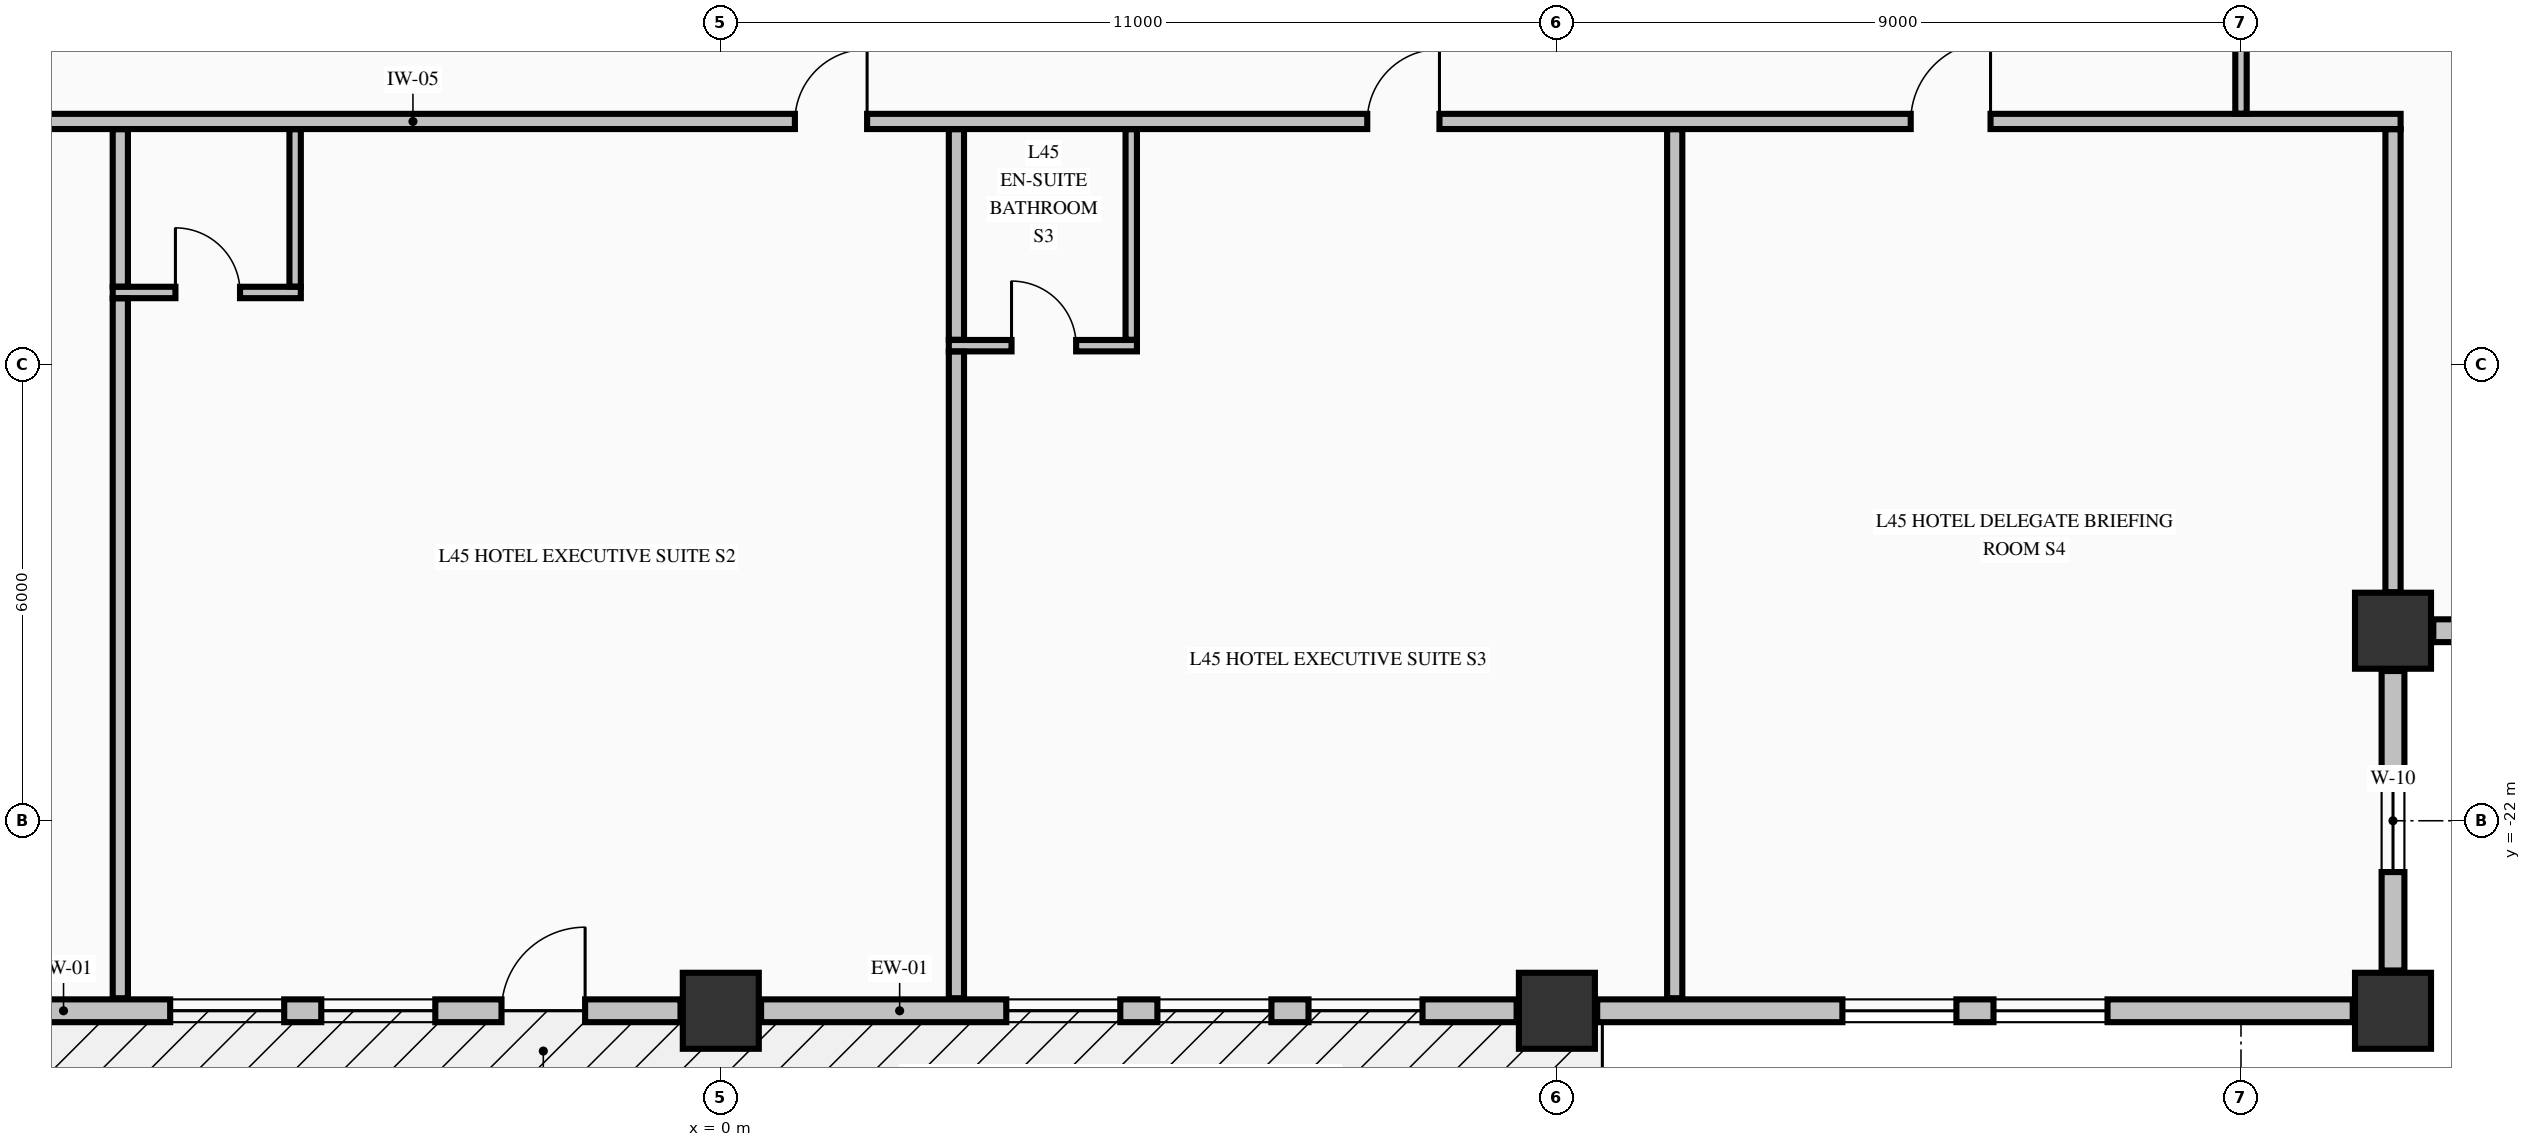
"""IFC4 building model, lengths in metres.
Left out: names, types, materials, properties, quantities, classifications, styles, units other than length and angle.
Written with IfcOpenShell. Run it as: python <this file> out.ifc"""

import sys

from ifc_helpers import new_model, si_unit, direction, frame, frame_2d, origin, origin_2d, place, context, subcontext, project, spatial, rectangle, extrude, element, fill, save


model = new_model("IFC4")
c1 = context("Model", 3, precision=1e-05, world=origin(), true_north=direction((0.0, 1.0)))
c2 = subcontext(c1, "Body", "Model", "MODEL_VIEW")
j1 = project(units=[si_unit("LENGTHUNIT", "METRE"), si_unit("PLANEANGLEUNIT", "RADIAN")], contexts=[c1])
p1 = place(None, origin())
s1 = spatial("IfcSite", under=j1, at=p1, CompositionType="ELEMENT")
p2 = place(p1, origin())
s2 = spatial("IfcBuilding", under=s1, at=p2, CompositionType="ELEMENT")
p3 = place(p2, frame((0.0, 0.0, 176.26)))
s3 = spatial("IfcBuildingStorey", under=s2, at=p3, CompositionType="ELEMENT", Elevation=176.26)
for number, where, z_axis, x_axis in (
    (1, (0.0, -24.5, -0.275), (0.0, 0.0, 1.0), (1.0, 0.0, 0.0)),
    (2, (11.0, -24.5, -0.275), (0.0, 0.0, 1.0), (1.0, 0.0, 0.0)),
    (3, (22.0, -24.5, -0.275), (0.0, 0.0, 1.0), (1.0, 0.0, 0.0)),
    (4, (22.0, -19.5, -0.275), (0.0, 0.0, 1.0), (1.0, 0.0, 0.0)),
):
    element("IfcColumn", number, at=place(p3, frame(where, z_axis=z_axis, x_axis=x_axis)), inside=s3, PredefinedType="COLUMN", context=c2, shape_type="SweptSolid", body=[
        extrude(rectangle(XDim=1.0, YDim=1.0, at=origin_2d()), origin(), (0.0, 0.0, 1.0), 3.425),
    ])
p4 = place(p3, frame((22.0, -23.97, 0.0), z_axis=(0.0, 0.0, 1.0), x_axis=(0.0, 1.0, 0.0)))
e5 = element("IfcWall", 5, at=p4, inside=s3, PredefinedType="STANDARD", context=c2, shape_type="SweptSolid", body=[
    extrude(rectangle(XDim=3.94, YDim=0.3, at=frame_2d((1.97, 0.0))), origin(), (0.0, 0.0, 1.0), 2.542),
])
p5 = place(p4, frame((1.295, 0.0, 0.68)))
e6 = element("IfcOpeningElement", 6, at=p5, cuts=e5, PredefinedType="OPENING", context=c2, shape_type="SweptSolid", body=[
    extrude(rectangle(XDim=1.35, YDim=1.42, at=frame_2d((0.675, 0.71))), frame((0.0, 0.16, 0.0), z_axis=(0.0, -1.0, 0.0), x_axis=(1.0, 0.0, 0.0)), (0.0, 0.0, 1.0), 0.32),
])
p6 = place(p3, frame((22.53, -19.5, 0.0), z_axis=(0.0, 0.0, 1.0), x_axis=(1.0, 0.0, 0.0)))
e7 = element("IfcWall", 7, at=p6, inside=s3, PredefinedType="STANDARD", context=c2, shape_type="SweptSolid", body=[
    extrude(rectangle(XDim=3.94, YDim=0.3, at=frame_2d((1.97, 0.0))), origin(), (0.0, 0.0, 1.0), 2.542),
])
p7 = place(p6, frame((1.295, 0.0, 0.68)))
e8 = element("IfcOpeningElement", 8, at=p7, cuts=e7, PredefinedType="OPENING", context=c2, shape_type="SweptSolid", body=[
    extrude(rectangle(XDim=1.35, YDim=1.42, at=frame_2d((0.675, 0.71))), frame((0.0, 0.16, 0.0), z_axis=(0.0, -1.0, 0.0), x_axis=(1.0, 0.0, 0.0)), (0.0, 0.0, 1.0), 0.32),
])
p8 = place(p3, frame((-10.47, -24.5, 0.0), z_axis=(0.0, 0.0, 1.0), x_axis=(1.0, 0.0, 0.0)))
e9 = element("IfcWall", 9, at=p8, inside=s3, PredefinedType="STANDARD", context=c2, shape_type="SweptSolid", body=[
    extrude(rectangle(XDim=9.94, YDim=0.3, at=frame_2d((4.97, 0.0))), origin(), (0.0, 0.0, 1.0), 2.542),
])
p9 = place(p8, frame((7.585, 0.0, 0.0)))
e10 = element("IfcOpeningElement", 10, at=p9, cuts=e9, PredefinedType="OPENING", context=c2, shape_type="SweptSolid", body=[
    extrude(rectangle(XDim=1.1, YDim=2.15, at=frame_2d((0.55, 1.075))), frame((0.0, 0.16, 0.0), z_axis=(0.0, -1.0, 0.0), x_axis=(1.0, 0.0, 0.0)), (0.0, 0.0, 1.0), 0.32),
])
p10 = place(p8, frame((3.226, 0.0, 0.72)))
e11 = element("IfcOpeningElement", 11, at=p10, cuts=e9, PredefinedType="OPENING", context=c2, shape_type="SweptSolid", body=[
    extrude(rectangle(XDim=1.5, YDim=1.6, at=frame_2d((0.75, 0.8))), frame((0.0, 0.16, 0.0), z_axis=(0.0, -1.0, 0.0), x_axis=(1.0, 0.0, 0.0)), (0.0, 0.0, 1.0), 0.32),
])
p11 = place(p8, frame((5.214, 0.0, 0.72)))
e12 = element("IfcOpeningElement", 12, at=p11, cuts=e9, PredefinedType="OPENING", context=c2, shape_type="SweptSolid", body=[
    extrude(rectangle(XDim=1.5, YDim=1.6, at=frame_2d((0.75, 0.8))), frame((0.0, 0.16, 0.0), z_axis=(0.0, -1.0, 0.0), x_axis=(1.0, 0.0, 0.0)), (0.0, 0.0, 1.0), 0.32),
])
p12 = place(p3, frame((0.53, -24.5, 0.0), z_axis=(0.0, 0.0, 1.0), x_axis=(1.0, 0.0, 0.0)))
e13 = element("IfcWall", 13, at=p12, inside=s3, PredefinedType="STANDARD", context=c2, shape_type="SweptSolid", body=[
    extrude(rectangle(XDim=9.94, YDim=0.3, at=frame_2d((4.97, 0.0))), origin(), (0.0, 0.0, 1.0), 2.542),
])
p13 = place(p12, frame((3.226, 0.0, 0.72)))
e14 = element("IfcOpeningElement", 14, at=p13, cuts=e13, PredefinedType="OPENING", context=c2, shape_type="SweptSolid", body=[
    extrude(rectangle(XDim=1.5, YDim=1.6, at=frame_2d((0.75, 0.8))), frame((0.0, 0.16, 0.0), z_axis=(0.0, -1.0, 0.0), x_axis=(1.0, 0.0, 0.0)), (0.0, 0.0, 1.0), 0.32),
])
p14 = place(p12, frame((5.214, 0.0, 0.72)))
e15 = element("IfcOpeningElement", 15, at=p14, cuts=e13, PredefinedType="OPENING", context=c2, shape_type="SweptSolid", body=[
    extrude(rectangle(XDim=1.5, YDim=1.6, at=frame_2d((0.75, 0.8))), frame((0.0, 0.16, 0.0), z_axis=(0.0, -1.0, 0.0), x_axis=(1.0, 0.0, 0.0)), (0.0, 0.0, 1.0), 0.32),
])
p15 = place(p12, frame((7.202, 0.0, 0.72)))
e16 = element("IfcOpeningElement", 16, at=p15, cuts=e13, PredefinedType="OPENING", context=c2, shape_type="SweptSolid", body=[
    extrude(rectangle(XDim=1.5, YDim=1.6, at=frame_2d((0.75, 0.8))), frame((0.0, 0.16, 0.0), z_axis=(0.0, -1.0, 0.0), x_axis=(1.0, 0.0, 0.0)), (0.0, 0.0, 1.0), 0.32),
])
p16 = place(p3, frame((11.53, -24.5, 0.0), z_axis=(0.0, 0.0, 1.0), x_axis=(1.0, 0.0, 0.0)))
e17 = element("IfcWall", 17, at=p16, inside=s3, PredefinedType="STANDARD", context=c2, shape_type="SweptSolid", body=[
    extrude(rectangle(XDim=9.94, YDim=0.3, at=frame_2d((4.97, 0.0))), origin(), (0.0, 0.0, 1.0), 2.542),
])
p17 = place(p16, frame((3.226, 0.0, 0.72)))
e18 = element("IfcOpeningElement", 18, at=p17, cuts=e17, PredefinedType="OPENING", context=c2, shape_type="SweptSolid", body=[
    extrude(rectangle(XDim=1.5, YDim=1.6, at=frame_2d((0.75, 0.8))), frame((0.0, 0.16, 0.0), z_axis=(0.0, -1.0, 0.0), x_axis=(1.0, 0.0, 0.0)), (0.0, 0.0, 1.0), 0.32),
])
p18 = place(p16, frame((5.214, 0.0, 0.72)))
e19 = element("IfcOpeningElement", 19, at=p18, cuts=e17, PredefinedType="OPENING", context=c2, shape_type="SweptSolid", body=[
    extrude(rectangle(XDim=1.5, YDim=1.6, at=frame_2d((0.75, 0.8))), frame((0.0, 0.16, 0.0), z_axis=(0.0, -1.0, 0.0), x_axis=(1.0, 0.0, 0.0)), (0.0, 0.0, 1.0), 0.32),
])
p19 = place(p3, frame((3.0, -15.75, 0.0), z_axis=(0.0, 0.0, 1.0), x_axis=(1.0, 0.0, 0.0)))
e20 = element("IfcWall", 20, at=p19, inside=s3, PredefinedType="PARTITIONING", context=c2, shape_type="SweptSolid", body=[
    extrude(rectangle(XDim=2.475, YDim=0.15, at=frame_2d((1.238, 0.0))), origin(), (0.0, 0.0, 1.0), 3.15),
])
p20 = place(p19, frame((0.825, 0.0, 0.0)))
e21 = element("IfcOpeningElement", 21, at=p20, cuts=e20, PredefinedType="OPENING", context=c2, shape_type="SweptSolid", body=[
    extrude(rectangle(XDim=0.85, YDim=2.1, at=frame_2d((0.425, 1.05))), frame((0.0, 0.085, 0.0), z_axis=(0.0, -1.0, 0.0), x_axis=(1.0, 0.0, 0.0)), (0.0, 0.0, 1.0), 0.17),
])
p21 = place(p3, frame((-8.0, -15.05, 0.0), z_axis=(0.0, 0.0, 1.0), x_axis=(1.0, 0.0, 0.0)))
e22 = element("IfcWall", 22, at=p21, inside=s3, PredefinedType="PARTITIONING", context=c2, shape_type="SweptSolid", body=[
    extrude(rectangle(XDim=2.475, YDim=0.15, at=frame_2d((1.238, 0.0))), origin(), (0.0, 0.0, 1.0), 3.15),
])
p22 = place(p21, frame((0.825, 0.0, 0.0)))
e23 = element("IfcOpeningElement", 23, at=p22, cuts=e22, PredefinedType="OPENING", context=c2, shape_type="SweptSolid", body=[
    extrude(rectangle(XDim=0.85, YDim=2.1, at=frame_2d((0.425, 1.05))), frame((0.0, 0.085, 0.0), z_axis=(0.0, -1.0, 0.0), x_axis=(1.0, 0.0, 0.0)), (0.0, 0.0, 1.0), 0.17),
])
p23 = place(p3, frame((-17.1, -12.8, 0.0), z_axis=(0.0, 0.0, 1.0), x_axis=(1.0, 0.0, 0.0)))
e24 = element("IfcWall", 24, at=p23, inside=s3, PredefinedType="PARTITIONING", context=c2, shape_type="SweptSolid", body=[
    extrude(rectangle(XDim=39.2, YDim=0.2, at=frame_2d((19.6, 0.0))), origin(), (0.0, 0.0, 1.0), 3.15),
])
p24 = place(p23, frame((7.075, 0.0, 0.0)))
e25 = element("IfcOpeningElement", 25, at=p24, cuts=e24, PredefinedType="OPENING", context=c2, shape_type="SweptSolid", body=[
    extrude(rectangle(XDim=0.95, YDim=2.15, at=frame_2d((0.475, 1.075))), frame((0.0, 0.11, 0.0), z_axis=(0.0, -1.0, 0.0), x_axis=(1.0, 0.0, 0.0)), (0.0, 0.0, 1.0), 0.22),
])
p25 = place(p23, frame((18.075, 0.0, 0.0)))
e26 = element("IfcOpeningElement", 26, at=p25, cuts=e24, PredefinedType="OPENING", context=c2, shape_type="SweptSolid", body=[
    extrude(rectangle(XDim=0.95, YDim=2.15, at=frame_2d((0.475, 1.075))), frame((0.0, 0.11, 0.0), z_axis=(0.0, -1.0, 0.0), x_axis=(1.0, 0.0, 0.0)), (0.0, 0.0, 1.0), 0.22),
])
p26 = place(p23, frame((25.605, 0.0, 0.0)))
e27 = element("IfcOpeningElement", 27, at=p26, cuts=e24, PredefinedType="OPENING", context=c2, shape_type="SweptSolid", body=[
    extrude(rectangle(XDim=0.95, YDim=2.15, at=frame_2d((0.475, 1.075))), frame((0.0, 0.11, 0.0), z_axis=(0.0, -1.0, 0.0), x_axis=(1.0, 0.0, 0.0)), (0.0, 0.0, 1.0), 0.22),
])
p27 = place(p23, frame((32.755, 0.0, 0.0)))
e28 = element("IfcOpeningElement", 28, at=p27, cuts=e24, PredefinedType="OPENING", context=c2, shape_type="SweptSolid", body=[
    extrude(rectangle(XDim=1.05, YDim=2.15, at=frame_2d((0.525, 1.075))), frame((0.0, 0.11, 0.0), z_axis=(0.0, -1.0, 0.0), x_axis=(1.0, 0.0, 0.0)), (0.0, 0.0, 1.0), 0.22),
])
p28 = place(p3, frame((-7.9, -24.335, 0.0), z_axis=(0.0, 0.0, 1.0), x_axis=(0.0, 1.0, 0.0)))
e29 = element("IfcWall", 29, at=p28, inside=s3, PredefinedType="PARTITIONING", context=c2, shape_type="SweptSolid", body=[
    extrude(rectangle(XDim=9.207, YDim=0.2, at=frame_2d((4.604, 0.0))), origin(), (0.0, 0.0, 1.0), 3.15),
])
p29 = place(p3, frame((-7.9, -14.972, 0.0), z_axis=(0.0, 0.0, 1.0), x_axis=(0.0, 1.0, 0.0)))
e30 = element("IfcWall", 30, at=p29, inside=s3, PredefinedType="PARTITIONING", context=c2, shape_type="SweptSolid", body=[
    extrude(rectangle(XDim=2.069, YDim=0.2, at=frame_2d((1.034, 0.0))), origin(), (0.0, 0.0, 1.0), 3.15),
])
p30 = place(p3, frame((-5.6, -14.972, 0.0), z_axis=(0.0, 0.0, 1.0), x_axis=(0.0, 1.0, 0.0)))
e31 = element("IfcWall", 31, at=p30, inside=s3, PredefinedType="PARTITIONING", context=c2, shape_type="SweptSolid", body=[
    extrude(rectangle(XDim=2.069, YDim=0.15, at=frame_2d((1.034, 0.0))), origin(), (0.0, 0.0, 1.0), 3.15),
])
p31 = place(p3, frame((3.1, -24.335, 0.0), z_axis=(0.0, 0.0, 1.0), x_axis=(0.0, 1.0, 0.0)))
e32 = element("IfcWall", 32, at=p31, inside=s3, PredefinedType="PARTITIONING", context=c2, shape_type="SweptSolid", body=[
    extrude(rectangle(XDim=8.507, YDim=0.2, at=frame_2d((4.253, 0.0))), origin(), (0.0, 0.0, 1.0), 3.15),
])
p32 = place(p3, frame((3.1, -15.672, 0.0), z_axis=(0.0, 0.0, 1.0), x_axis=(0.0, 1.0, 0.0)))
e33 = element("IfcWall", 33, at=p32, inside=s3, PredefinedType="PARTITIONING", context=c2, shape_type="SweptSolid", body=[
    extrude(rectangle(XDim=2.769, YDim=0.2, at=frame_2d((1.385, 0.0))), origin(), (0.0, 0.0, 1.0), 3.15),
])
p33 = place(p3, frame((5.4, -15.672, 0.0), z_axis=(0.0, 0.0, 1.0), x_axis=(0.0, 1.0, 0.0)))
e34 = element("IfcWall", 34, at=p33, inside=s3, PredefinedType="PARTITIONING", context=c2, shape_type="SweptSolid", body=[
    extrude(rectangle(XDim=2.769, YDim=0.15, at=frame_2d((1.385, 0.0))), origin(), (0.0, 0.0, 1.0), 3.15),
])
p34 = place(p3, frame((12.55, -24.335, 0.0), z_axis=(0.0, 0.0, 1.0), x_axis=(0.0, 1.0, 0.0)))
e35 = element("IfcWall", 35, at=p34, inside=s3, PredefinedType="PARTITIONING", context=c2, shape_type="SweptSolid", body=[
    extrude(rectangle(XDim=11.432, YDim=0.2, at=frame_2d((5.716, 0.0))), origin(), (0.0, 0.0, 1.0), 3.15),
])
p35 = place(p3, frame((20.0, -12.697, 0.0), z_axis=(0.0, 0.0, 1.0), x_axis=(0.0, 1.0, 0.0)))
e36 = element("IfcWall", 36, at=p35, inside=s3, PredefinedType="PARTITIONING", context=c2, shape_type="SweptSolid", body=[
    extrude(rectangle(XDim=2.316, YDim=0.15, at=frame_2d((1.158, 0.0))), origin(), (0.0, 0.0, 1.0), 2.342),
])
p36 = place(p3, frame((22.0, -18.994, 0.0), z_axis=(0.0, 0.0, 1.0), x_axis=(0.0, 1.0, 0.0)))
e37 = element("IfcWall", 37, at=p36, inside=s3, PredefinedType="PARTITIONING", context=c2, shape_type="SweptSolid", body=[
    extrude(rectangle(XDim=6.091, YDim=0.2, at=frame_2d((3.045, 0.0))), origin(), (0.0, 0.0, 1.0), 3.15),
])
p37 = place(p5, origin())
e38 = element("IfcWindow", 38, at=p37, inside=s3, PartitioningType="SINGLE_PANEL", PredefinedType="WINDOW", context=c2, shape_type="SweptSolid", body=[
    extrude(rectangle(XDim=1.35, YDim=1.42, at=frame_2d((0.675, 0.71))), frame((0.0, 0.03, 0.0), z_axis=(0.0, -1.0, 0.0), x_axis=(1.0, 0.0, 0.0)), (0.0, 0.0, 1.0), 0.06),
])
fill(e6, e38)
p38 = place(p9, origin())
e39 = element("IfcDoor", 39, at=p38, inside=s3, OperationType="SINGLE_SWING_RIGHT", PredefinedType="DOOR", context=c2, shape_type="SweptSolid", body=[
    extrude(rectangle(XDim=1.1, YDim=2.15, at=frame_2d((0.55, 1.075))), frame((0.0, 0.025, 0.0), z_axis=(0.0, -1.0, 0.0), x_axis=(1.0, 0.0, 0.0)), (0.0, 0.0, 1.0), 0.05),
])
fill(e10, e39)
p39 = place(p10, origin())
e40 = element("IfcWindow", 40, at=p39, inside=s3, PartitioningType="SINGLE_PANEL", PredefinedType="WINDOW", context=c2, shape_type="SweptSolid", body=[
    extrude(rectangle(XDim=1.5, YDim=1.6, at=frame_2d((0.75, 0.8))), frame((0.0, 0.03, 0.0), z_axis=(0.0, -1.0, 0.0), x_axis=(1.0, 0.0, 0.0)), (0.0, 0.0, 1.0), 0.06),
])
fill(e11, e40)
p40 = place(p11, origin())
e41 = element("IfcWindow", 41, at=p40, inside=s3, PartitioningType="SINGLE_PANEL", PredefinedType="WINDOW", context=c2, shape_type="SweptSolid", body=[
    extrude(rectangle(XDim=1.5, YDim=1.6, at=frame_2d((0.75, 0.8))), frame((0.0, 0.03, 0.0), z_axis=(0.0, -1.0, 0.0), x_axis=(1.0, 0.0, 0.0)), (0.0, 0.0, 1.0), 0.06),
])
fill(e12, e41)
p41 = place(p13, origin())
e42 = element("IfcWindow", 42, at=p41, inside=s3, PartitioningType="SINGLE_PANEL", PredefinedType="WINDOW", context=c2, shape_type="SweptSolid", body=[
    extrude(rectangle(XDim=1.5, YDim=1.6, at=frame_2d((0.75, 0.8))), frame((0.0, 0.03, 0.0), z_axis=(0.0, -1.0, 0.0), x_axis=(1.0, 0.0, 0.0)), (0.0, 0.0, 1.0), 0.06),
])
fill(e14, e42)
p42 = place(p14, origin())
e43 = element("IfcWindow", 43, at=p42, inside=s3, PartitioningType="SINGLE_PANEL", PredefinedType="WINDOW", context=c2, shape_type="SweptSolid", body=[
    extrude(rectangle(XDim=1.5, YDim=1.6, at=frame_2d((0.75, 0.8))), frame((0.0, 0.03, 0.0), z_axis=(0.0, -1.0, 0.0), x_axis=(1.0, 0.0, 0.0)), (0.0, 0.0, 1.0), 0.06),
])
fill(e15, e43)
p43 = place(p15, origin())
e44 = element("IfcWindow", 44, at=p43, inside=s3, PartitioningType="SINGLE_PANEL", PredefinedType="WINDOW", context=c2, shape_type="SweptSolid", body=[
    extrude(rectangle(XDim=1.5, YDim=1.6, at=frame_2d((0.75, 0.8))), frame((0.0, 0.03, 0.0), z_axis=(0.0, -1.0, 0.0), x_axis=(1.0, 0.0, 0.0)), (0.0, 0.0, 1.0), 0.06),
])
fill(e16, e44)
p44 = place(p17, origin())
e45 = element("IfcWindow", 45, at=p44, inside=s3, PartitioningType="SINGLE_PANEL", PredefinedType="WINDOW", context=c2, shape_type="SweptSolid", body=[
    extrude(rectangle(XDim=1.5, YDim=1.6, at=frame_2d((0.75, 0.8))), frame((0.0, 0.03, 0.0), z_axis=(0.0, -1.0, 0.0), x_axis=(1.0, 0.0, 0.0)), (0.0, 0.0, 1.0), 0.06),
])
fill(e18, e45)
p45 = place(p18, origin())
e46 = element("IfcWindow", 46, at=p45, inside=s3, PartitioningType="SINGLE_PANEL", PredefinedType="WINDOW", context=c2, shape_type="SweptSolid", body=[
    extrude(rectangle(XDim=1.5, YDim=1.6, at=frame_2d((0.75, 0.8))), frame((0.0, 0.03, 0.0), z_axis=(0.0, -1.0, 0.0), x_axis=(1.0, 0.0, 0.0)), (0.0, 0.0, 1.0), 0.06),
])
fill(e19, e46)
p46 = place(p25, origin())
e47 = element("IfcDoor", 47, at=p46, inside=s3, OperationType="SINGLE_SWING_RIGHT", PredefinedType="DOOR", context=c2, shape_type="SweptSolid", body=[
    extrude(rectangle(XDim=0.95, YDim=2.15, at=frame_2d((0.475, 1.075))), frame((0.0, 0.025, 0.0), z_axis=(0.0, -1.0, 0.0), x_axis=(1.0, 0.0, 0.0)), (0.0, 0.0, 1.0), 0.05),
])
fill(e26, e47)
p47 = place(p22, origin())
e48 = element("IfcDoor", 48, at=p47, inside=s3, OperationType="SINGLE_SWING_LEFT", PredefinedType="DOOR", context=c2, shape_type="SweptSolid", body=[
    extrude(rectangle(XDim=0.85, YDim=2.1, at=frame_2d((0.425, 1.05))), frame((0.0, 0.025, 0.0), z_axis=(0.0, -1.0, 0.0), x_axis=(1.0, 0.0, 0.0)), (0.0, 0.0, 1.0), 0.05),
])
fill(e23, e48)
p48 = place(p26, origin())
e49 = element("IfcDoor", 49, at=p48, inside=s3, OperationType="SINGLE_SWING_RIGHT", PredefinedType="DOOR", context=c2, shape_type="SweptSolid", body=[
    extrude(rectangle(XDim=0.95, YDim=2.15, at=frame_2d((0.475, 1.075))), frame((0.0, 0.025, 0.0), z_axis=(0.0, -1.0, 0.0), x_axis=(1.0, 0.0, 0.0)), (0.0, 0.0, 1.0), 0.05),
])
fill(e27, e49)
p49 = place(p20, origin())
e50 = element("IfcDoor", 50, at=p49, inside=s3, OperationType="SINGLE_SWING_LEFT", PredefinedType="DOOR", context=c2, shape_type="SweptSolid", body=[
    extrude(rectangle(XDim=0.85, YDim=2.1, at=frame_2d((0.425, 1.05))), frame((0.0, 0.025, 0.0), z_axis=(0.0, -1.0, 0.0), x_axis=(1.0, 0.0, 0.0)), (0.0, 0.0, 1.0), 0.05),
])
fill(e21, e50)
p50 = place(p27, origin())
e51 = element("IfcDoor", 51, at=p50, inside=s3, OperationType="SINGLE_SWING_RIGHT", PredefinedType="DOOR", context=c2, shape_type="SweptSolid", body=[
    extrude(rectangle(XDim=1.05, YDim=2.15, at=frame_2d((0.525, 1.075))), frame((0.0, 0.025, 0.0), z_axis=(0.0, -1.0, 0.0), x_axis=(1.0, 0.0, 0.0)), (0.0, 0.0, 1.0), 0.05),
])
fill(e28, e51)
save(model, sys.argv[1])
